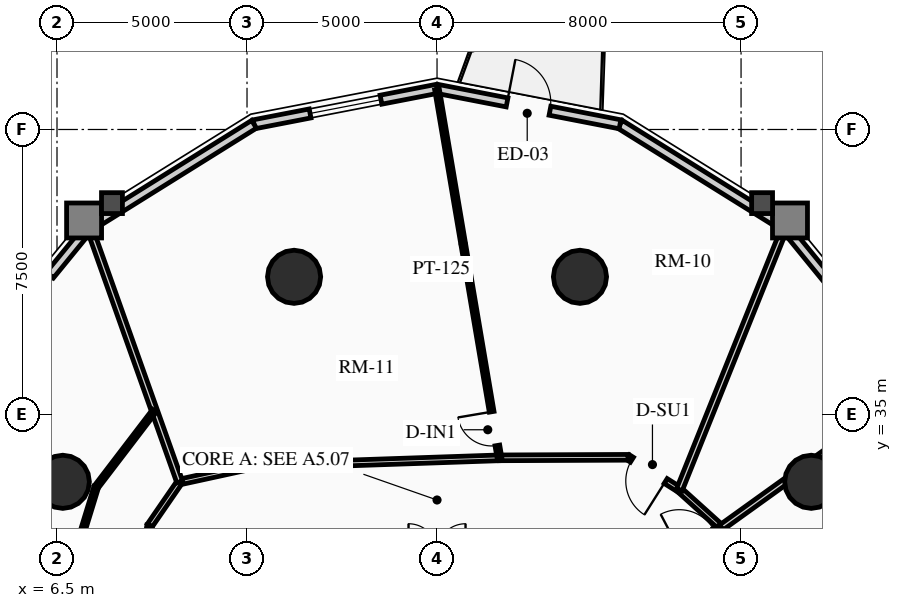
"""IFC4 building model, lengths in metres.
Left out: names, types, materials, properties, quantities, classifications, styles, units other than length and angle.
Written with IfcOpenShell. Run it as: python <this file> out.ifc"""

import sys

from ifc_helpers import new_model, si_unit, direction, frame, frame_2d, origin, origin_2d, place, context, subcontext, project, spatial, rectangle, circle, extrude, source, transform, mapped, element, fill, save


model = new_model("IFC4")
c1 = context("Model", 3, precision=1e-05, world=origin(), true_north=direction((0.0, 1.0)))
c2 = subcontext(c1, "Body", "Model", "MODEL_VIEW")
j1 = project(units=[si_unit("LENGTHUNIT", "METRE"), si_unit("PLANEANGLEUNIT", "RADIAN")], contexts=[c1])
p1 = place(None, origin())
s1 = spatial("IfcSite", under=j1, at=p1, CompositionType="ELEMENT")
p2 = place(p1, origin())
s2 = spatial("IfcBuilding", under=s1, at=p2, CompositionType="ELEMENT")
p3 = place(p2, frame((0.0, 0.0, 119.62)))
s3 = spatial("IfcBuildingStorey", under=s2, at=p3, CompositionType="ELEMENT", Elevation=119.62)
for number, where, z_axis, x_axis in (
    (1, (26.347, 33.229, 0.0), (0.0, 0.0, 1.0), (1.0, 0.0, 0.0)),
    (2, (20.261, 38.623, 0.0), (0.0, 0.0, 1.0), (1.0, 0.0, 0.0)),
    (3, (12.739, 38.623, 0.0), (0.0, 0.0, 1.0), (1.0, 0.0, 0.0)),
    (4, (6.653, 33.229, 0.0), (0.0, 0.0, 1.0), (1.0, 0.0, 0.0)),
):
    element("IfcColumn", number, at=place(p3, frame(where, z_axis=z_axis, x_axis=x_axis)), inside=s3, PredefinedType="USERDEFINED", context=c2, shape_type="SweptSolid", body=[
        extrude(circle(Radius=0.7, at=origin_2d()), origin(), (0.0, 0.0, 1.0), 2.91),
    ])
p4 = place(p3, frame((25.658, 39.928, 0.0), z_axis=(0.0, 0.0, 1.0), x_axis=(0.632700781152, -0.77439635945, 0.0)))
e5 = element("IfcWall", 5, at=p4, inside=s3, PredefinedType="SOLIDWALL", context=c2, shape_type="SweptSolid", body=[
    extrude(rectangle(XDim=5.448, YDim=0.24, at=frame_2d((2.724, 0.0))), origin(), (0.0, 0.0, 1.0), 2.179),
])
m1 = source(origin(), c2, "Body", "SweptSolid", [
    extrude(rectangle(XDim=1.9, YDim=1.35, at=frame_2d((0.95, 0.675))), frame((0.0, 0.13, 0.0), z_axis=(0.0, -1.0, 0.0), x_axis=(1.0, 0.0, 0.0)), (0.0, 0.0, 1.0), 0.26),
])
p5 = place(p4, frame((1.774, 0.0, 0.65)))
e6 = element("IfcOpeningElement", 6, at=p5, cuts=e5, PredefinedType="OPENING", context=c2, shape_type="MappedRepresentation", body=[
    mapped(m1, transform((0.0, 0.0, 0.0), x_axis=(1.0, 0.0, 0.0), y_axis=(0.0, 1.0, 0.0), z_axis=(0.0, 0.0, 1.0), scale=1.0)),
])
p6 = place(p3, frame((21.315, 42.637, 0.0), z_axis=(0.0, 0.0, 1.0), x_axis=(0.848520380187, -0.529162701263, 0.0)))
e7 = element("IfcWall", 7, at=p6, inside=s3, PredefinedType="SOLIDWALL", context=c2, shape_type="SweptSolid", body=[
    extrude(rectangle(XDim=5.119, YDim=0.24, at=frame_2d((2.56, 0.0))), origin(), (0.0, 0.0, 1.0), 2.179),
])
p7 = place(p3, frame((16.5, 43.57, 0.0), z_axis=(0.0, 0.0, 1.0), x_axis=(0.981723785992, -0.190311344954, 0.0)))
e8 = element("IfcWall", 8, at=p7, inside=s3, PredefinedType="SOLIDWALL", context=c2, shape_type="SweptSolid", body=[
    extrude(rectangle(XDim=4.904, YDim=0.24, at=frame_2d((2.452, 0.0))), origin(), (0.0, 0.0, 1.0), 2.179),
])
m2 = source(origin(), c2, "Body", "SweptSolid", [
    extrude(rectangle(XDim=1.15, YDim=2.005, at=frame_2d((0.575, 1.002))), frame((0.0, 0.13, 0.0), z_axis=(0.0, -1.0, 0.0), x_axis=(1.0, 0.0, 0.0)), (0.0, 0.0, 1.0), 0.26),
])
p8 = place(p7, frame((1.877, 0.0, 0.0)))
e9 = element("IfcOpeningElement", 9, at=p8, cuts=e8, PredefinedType="OPENING", context=c2, shape_type="MappedRepresentation", body=[
    mapped(m2, transform((0.0, 0.0, 0.0), x_axis=(1.0, 0.0, 0.0), y_axis=(0.0, 1.0, 0.0), z_axis=(0.0, 0.0, 1.0), scale=1.0)),
])
p9 = place(p3, frame((11.685, 42.637, 0.0), z_axis=(0.0, 0.0, 1.0), x_axis=(0.981723785992, 0.190311344954, 0.0)))
e10 = element("IfcWall", 10, at=p9, inside=s3, PredefinedType="SOLIDWALL", context=c2, shape_type="SweptSolid", body=[
    extrude(rectangle(XDim=4.904, YDim=0.24, at=frame_2d((2.452, 0.0))), origin(), (0.0, 0.0, 1.0), 2.179),
])
p10 = place(p9, frame((1.502, 0.0, 0.65)))
e11 = element("IfcOpeningElement", 11, at=p10, cuts=e10, PredefinedType="OPENING", context=c2, shape_type="MappedRepresentation", body=[
    mapped(m1, transform((0.0, 0.0, 0.0), x_axis=(1.0, 0.0, 0.0), y_axis=(0.0, 1.0, 0.0), z_axis=(0.0, 0.0, 1.0), scale=1.0)),
])
p11 = place(p3, frame((7.342, 39.928, 0.0), z_axis=(0.0, 0.0, 1.0), x_axis=(0.848520380187, 0.529162701263, 0.0)))
e12 = element("IfcWall", 12, at=p11, inside=s3, PredefinedType="SOLIDWALL", context=c2, shape_type="SweptSolid", body=[
    extrude(rectangle(XDim=5.119, YDim=0.24, at=frame_2d((2.56, 0.0))), origin(), (0.0, 0.0, 1.0), 2.179),
])
p12 = place(p3, frame((3.895, 35.709, 0.0), z_axis=(0.0, 0.0, 1.0), x_axis=(0.632700781152, 0.77439635945, 0.0)))
e13 = element("IfcWall", 13, at=p12, inside=s3, PredefinedType="SOLIDWALL", context=c2, shape_type="SweptSolid", body=[
    extrude(rectangle(XDim=5.448, YDim=0.24, at=frame_2d((2.724, 0.0))), origin(), (0.0, 0.0, 1.0), 2.179),
])
m3 = source(origin(), c2, "Body", "SweptSolid", [
    extrude(rectangle(XDim=2.2, YDim=1.35, at=frame_2d((1.1, 0.675))), frame((0.0, 0.13, 0.0), z_axis=(0.0, -1.0, 0.0), x_axis=(1.0, 0.0, 0.0)), (0.0, 0.0, 1.0), 0.26),
])
p13 = place(p12, frame((1.624, 0.0, 0.65)))
e14 = element("IfcOpeningElement", 14, at=p13, cuts=e13, PredefinedType="OPENING", context=c2, shape_type="MappedRepresentation", body=[
    mapped(m3, transform((0.0, 0.0, 0.0), x_axis=(1.0, 0.0, 0.0), y_axis=(0.0, 1.0, 0.0), z_axis=(0.0, 0.0, 1.0), scale=1.0)),
])
p14 = place(p3, frame((23.98, 32.027, 0.0), z_axis=(0.0, 0.0, 1.0), x_axis=(-0.742353224332, 0.670008724065, 0.0)))
e15 = element("IfcWall", 15, at=p14, inside=s3, PredefinedType="PARTITIONING", context=c2, shape_type="SweptSolid", body=[
    extrude(rectangle(XDim=1.485, YDim=0.15, at=frame_2d((0.742, 0.0))), origin(), (0.0, 0.0, 1.0), 2.225),
])
p15 = place(p3, frame((22.877, 33.022, 0.0), z_axis=(0.0, 0.0, 1.0), x_axis=(-0.845895608855, 0.533348496689, 0.0)))
e16 = element("IfcWall", 16, at=p15, inside=s3, PredefinedType="PARTITIONING", context=c2, shape_type="SweptSolid", body=[
    extrude(rectangle(XDim=1.597, YDim=0.15, at=frame_2d((0.798, 0.0))), origin(), (0.0, 0.0, 1.0), 2.225),
])
m4 = source(origin(), c2, "Body", "SweptSolid", [
    extrude(rectangle(XDim=1.05, YDim=2.015, at=frame_2d((0.525, 1.007))), frame((0.0, 0.085, 0.0), z_axis=(0.0, -1.0, 0.0), x_axis=(1.0, 0.0, 0.0)), (0.0, 0.0, 1.0), 0.17),
])
p16 = place(p15, frame((0.427, 0.0, 0.0)))
e17 = element("IfcOpeningElement", 17, at=p16, cuts=e16, PredefinedType="OPENING", context=c2, shape_type="MappedRepresentation", body=[
    mapped(m4, transform((0.0, 0.0, 0.0), x_axis=(1.0, 0.0, 0.0), y_axis=(0.0, 1.0, 0.0), z_axis=(0.0, 0.0, 1.0), scale=1.0)),
])
p17 = place(p3, frame((21.527, 33.873, 0.0), z_axis=(0.0, 0.0, 1.0), x_axis=(-0.999991838845, -0.004040079574, 0.0)))
e18 = element("IfcWall", 18, at=p17, inside=s3, PredefinedType="PARTITIONING", context=c2, shape_type="SweptSolid", body=[
    extrude(rectangle(XDim=3.384, YDim=0.15, at=frame_2d((1.692, 0.0))), origin(), (0.0, 0.0, 1.0), 2.225),
])
p18 = place(p3, frame((18.143, 33.86, 0.0), z_axis=(0.0, 0.0, 1.0), x_axis=(-0.999419208319, -0.034077060363, 0.0)))
e19 = element("IfcWall", 19, at=p18, inside=s3, PredefinedType="PARTITIONING", context=c2, shape_type="SweptSolid", body=[
    extrude(rectangle(XDim=6.527, YDim=0.15, at=frame_2d((3.263, 0.0))), origin(), (0.0, 0.0, 1.0), 2.225),
])
p19 = place(p3, frame((11.62, 33.637, 0.0), z_axis=(0.0, 0.0, 1.0), x_axis=(-0.97702579435, -0.213121085711, 0.0)))
e20 = element("IfcWall", 20, at=p19, inside=s3, PredefinedType="PARTITIONING", context=c2, shape_type="SweptSolid", body=[
    extrude(rectangle(XDim=1.935, YDim=0.15, at=frame_2d((0.967, 0.0))), origin(), (0.0, 0.0, 1.0), 2.225),
])
p20 = place(p3, frame((9.729, 33.225, 0.0), z_axis=(0.0, 0.0, 1.0), x_axis=(-0.567183649484, -0.82359134755, 0.0)))
e21 = element("IfcWall", 21, at=p20, inside=s3, PredefinedType="PARTITIONING", context=c2, shape_type="SweptSolid", body=[
    extrude(rectangle(XDim=1.392, YDim=0.15, at=frame_2d((0.696, 0.0))), origin(), (0.0, 0.0, 1.0), 2.225),
])
p21 = place(p3, frame((8.94, 32.078, 0.0), z_axis=(0.0, 0.0, 1.0), x_axis=(-0.159148467753, -0.98725466077, 0.0)))
e22 = element("IfcWall", 22, at=p21, inside=s3, PredefinedType="PARTITIONING", context=c2, shape_type="SweptSolid", body=[
    extrude(rectangle(XDim=1.554, YDim=0.15, at=frame_2d((0.777, 0.0))), origin(), (0.0, 0.0, 1.0), 2.225),
])
p22 = place(p3, frame((23.98, 32.027, 0.0), z_axis=(0.0, 0.0, 1.0), x_axis=(0.812162479031, 0.58343132214, 0.0)))
e23 = element("IfcWall", 23, at=p22, inside=s3, PredefinedType="PARTITIONING", context=c2, shape_type="SweptSolid", body=[
    extrude(rectangle(XDim=6.291, YDim=0.16, at=frame_2d((3.146, 0.0))), origin(), (0.0, 0.0, 1.0), 2.179),
])
p23 = place(p3, frame((22.877, 33.022, 0.0), z_axis=(0.0, 0.0, 1.0), x_axis=(0.372898022516, 0.927872332168, 0.0)))
e24 = element("IfcWall", 24, at=p23, inside=s3, PredefinedType="PARTITIONING", context=c2, shape_type="SweptSolid", body=[
    extrude(rectangle(XDim=7.426, YDim=0.16, at=frame_2d((3.713, 0.0))), origin(), (0.0, 0.0, 1.0), 2.179),
])
p24 = place(p3, frame((9.729, 33.225, 0.0), z_axis=(0.0, 0.0, 1.0), x_axis=(-0.334806049563, 0.942287063042, 0.0)))
e25 = element("IfcWall", 25, at=p24, inside=s3, PredefinedType="PARTITIONING", context=c2, shape_type="SweptSolid", body=[
    extrude(rectangle(XDim=7.097, YDim=0.16, at=frame_2d((3.548, 0.0))), origin(), (0.0, 0.0, 1.0), 2.179),
])
p25 = place(p3, frame((22.075, 31.025, 0.0), z_axis=(0.0, 0.0, 1.0), x_axis=(0.885026466958, 0.465540710125, 0.0)))
e26 = element("IfcWall", 26, at=p25, inside=s3, PredefinedType="PARTITIONING", context=c2, shape_type="SweptSolid", body=[
    extrude(rectangle(XDim=2.152, YDim=0.16, at=frame_2d((1.076, 0.0))), origin(), (0.0, 0.0, 1.0), 2.225),
])
m5 = source(origin(), c2, "Body", "SweptSolid", [
    extrude(rectangle(XDim=1.05, YDim=2.015, at=frame_2d((0.525, 1.007))), frame((0.0, 0.09, 0.0), z_axis=(0.0, -1.0, 0.0), x_axis=(1.0, 0.0, 0.0)), (0.0, 0.0, 1.0), 0.18),
])
p26 = place(p25, frame((0.902, 0.0, 0.0)))
e27 = element("IfcOpeningElement", 27, at=p26, cuts=e26, PredefinedType="OPENING", context=c2, shape_type="MappedRepresentation", body=[
    mapped(m5, transform((0.0, 0.0, 0.0), x_axis=(1.0, 0.0, 0.0), y_axis=(0.0, 1.0, 0.0), z_axis=(0.0, 0.0, 1.0), scale=1.0)),
])
p27 = place(p3, frame((18.143, 33.86, 0.0), z_axis=(0.0, 0.0, 1.0), x_axis=(-0.167145472003, 0.985932244725, 0.0)))
e28 = element("IfcWall", 28, at=p27, inside=s3, PredefinedType="PARTITIONING", context=c2, shape_type="SweptSolid", body=[
    extrude(rectangle(XDim=9.829, YDim=0.125, at=frame_2d((4.914, 0.0))), origin(), (0.0, 0.0, 1.0), 2.179),
])
m6 = source(origin(), c2, "Body", "SweptSolid", [
    extrude(rectangle(XDim=0.9, YDim=2.005, at=frame_2d((0.45, 1.002))), frame((0.0, 0.073, 0.0), z_axis=(0.0, -1.0, 0.0), x_axis=(1.0, 0.0, 0.0)), (0.0, 0.0, 1.0), 0.145),
])
p28 = place(p27, frame((0.33, 0.0, 0.0)))
e29 = element("IfcOpeningElement", 29, at=p28, cuts=e28, PredefinedType="OPENING", context=c2, shape_type="MappedRepresentation", body=[
    mapped(m6, transform((0.0, 0.0, 0.0), x_axis=(1.0, 0.0, 0.0), y_axis=(0.0, 1.0, 0.0), z_axis=(0.0, 0.0, 1.0), scale=1.0)),
])
p29 = place(p3, frame((9.064, 35.097, 0.0), z_axis=(0.0, 0.0, 1.0), x_axis=(-0.607126893664, -0.794604892377, 0.0)))
e30 = element("IfcWall", 30, at=p29, inside=s3, PredefinedType="PARTITIONING", context=c2, shape_type="SweptSolid", body=[
    extrude(rectangle(XDim=2.524, YDim=0.125, at=frame_2d((1.262, 0.0))), origin(), (0.0, 0.0, 1.0), 2.179),
])
p30 = place(p3, frame((7.532, 33.092, 0.0), z_axis=(0.0, 0.0, 1.0), x_axis=(-0.293965637063, -0.955815988685, 0.0)))
e31 = element("IfcWall", 31, at=p30, inside=s3, PredefinedType="PARTITIONING", context=c2, shape_type="SweptSolid", body=[
    extrude(rectangle(XDim=2.712, YDim=0.125, at=frame_2d((1.356, 0.0))), origin(), (0.0, 0.0, 1.0), 2.225),
])
m7 = source(origin(), c2, "Body", "SweptSolid", [
    extrude(rectangle(XDim=1.15, YDim=2.005, at=frame_2d((0.575, 1.002))), frame((0.0, 0.025, 0.0), z_axis=(0.0, -1.0, 0.0), x_axis=(1.0, 0.0, 0.0)), (0.0, 0.0, 1.0), 0.05),
])
p31 = place(p8, origin())
e32 = element("IfcDoor", 32, at=p31, inside=s3, OperationType="SINGLE_SWING_LEFT", PredefinedType="DOOR", context=c2, shape_type="MappedRepresentation", body=[
    mapped(m7, transform((0.0, 0.0, 0.0), x_axis=(1.0, 0.0, 0.0), y_axis=(0.0, 1.0, 0.0), z_axis=(0.0, 0.0, 1.0), scale=1.0)),
])
fill(e9, e32)
m8 = source(origin(), c2, "Body", "SweptSolid", [
    extrude(rectangle(XDim=1.9, YDim=1.35, at=frame_2d((0.95, 0.675))), frame((0.0, 0.03, 0.0), z_axis=(0.0, -1.0, 0.0), x_axis=(1.0, 0.0, 0.0)), (0.0, 0.0, 1.0), 0.06),
])
p32 = place(p10, origin())
e33 = element("IfcWindow", 33, at=p32, inside=s3, PartitioningType="DOUBLE_PANEL_VERTICAL", PredefinedType="WINDOW", context=c2, shape_type="MappedRepresentation", body=[
    mapped(m8, transform((0.0, 0.0, 0.0), x_axis=(1.0, 0.0, 0.0), y_axis=(0.0, 1.0, 0.0), z_axis=(0.0, 0.0, 1.0), scale=1.0)),
])
fill(e11, e33)
m9 = source(origin(), c2, "Body", "SweptSolid", [
    extrude(rectangle(XDim=1.05, YDim=2.015, at=frame_2d((0.525, 1.007))), frame((0.0, 0.025, 0.0), z_axis=(0.0, -1.0, 0.0), x_axis=(1.0, 0.0, 0.0)), (0.0, 0.0, 1.0), 0.05),
])
p33 = place(p16, origin())
e34 = element("IfcDoor", 34, at=p33, inside=s3, OperationType="SINGLE_SWING_LEFT", PredefinedType="DOOR", context=c2, shape_type="MappedRepresentation", body=[
    mapped(m9, transform((0.0, 0.0, 0.0), x_axis=(1.0, 0.0, 0.0), y_axis=(0.0, 1.0, 0.0), z_axis=(0.0, 0.0, 1.0), scale=1.0)),
])
fill(e17, e34)
m10 = source(origin(), c2, "Body", "SweptSolid", [
    extrude(rectangle(XDim=0.9, YDim=2.005, at=frame_2d((0.45, 1.002))), frame((0.0, 0.025, 0.0), z_axis=(0.0, -1.0, 0.0), x_axis=(1.0, 0.0, 0.0)), (0.0, 0.0, 1.0), 0.05),
])
p34 = place(p28, origin())
e35 = element("IfcDoor", 35, at=p34, inside=s3, OperationType="SINGLE_SWING_RIGHT", PredefinedType="DOOR", context=c2, shape_type="MappedRepresentation", body=[
    mapped(m10, transform((0.0, 0.0, 0.0), x_axis=(1.0, 0.0, 0.0), y_axis=(0.0, 1.0, 0.0), z_axis=(0.0, 0.0, 1.0), scale=1.0)),
])
fill(e29, e35)
save(model, sys.argv[1])
